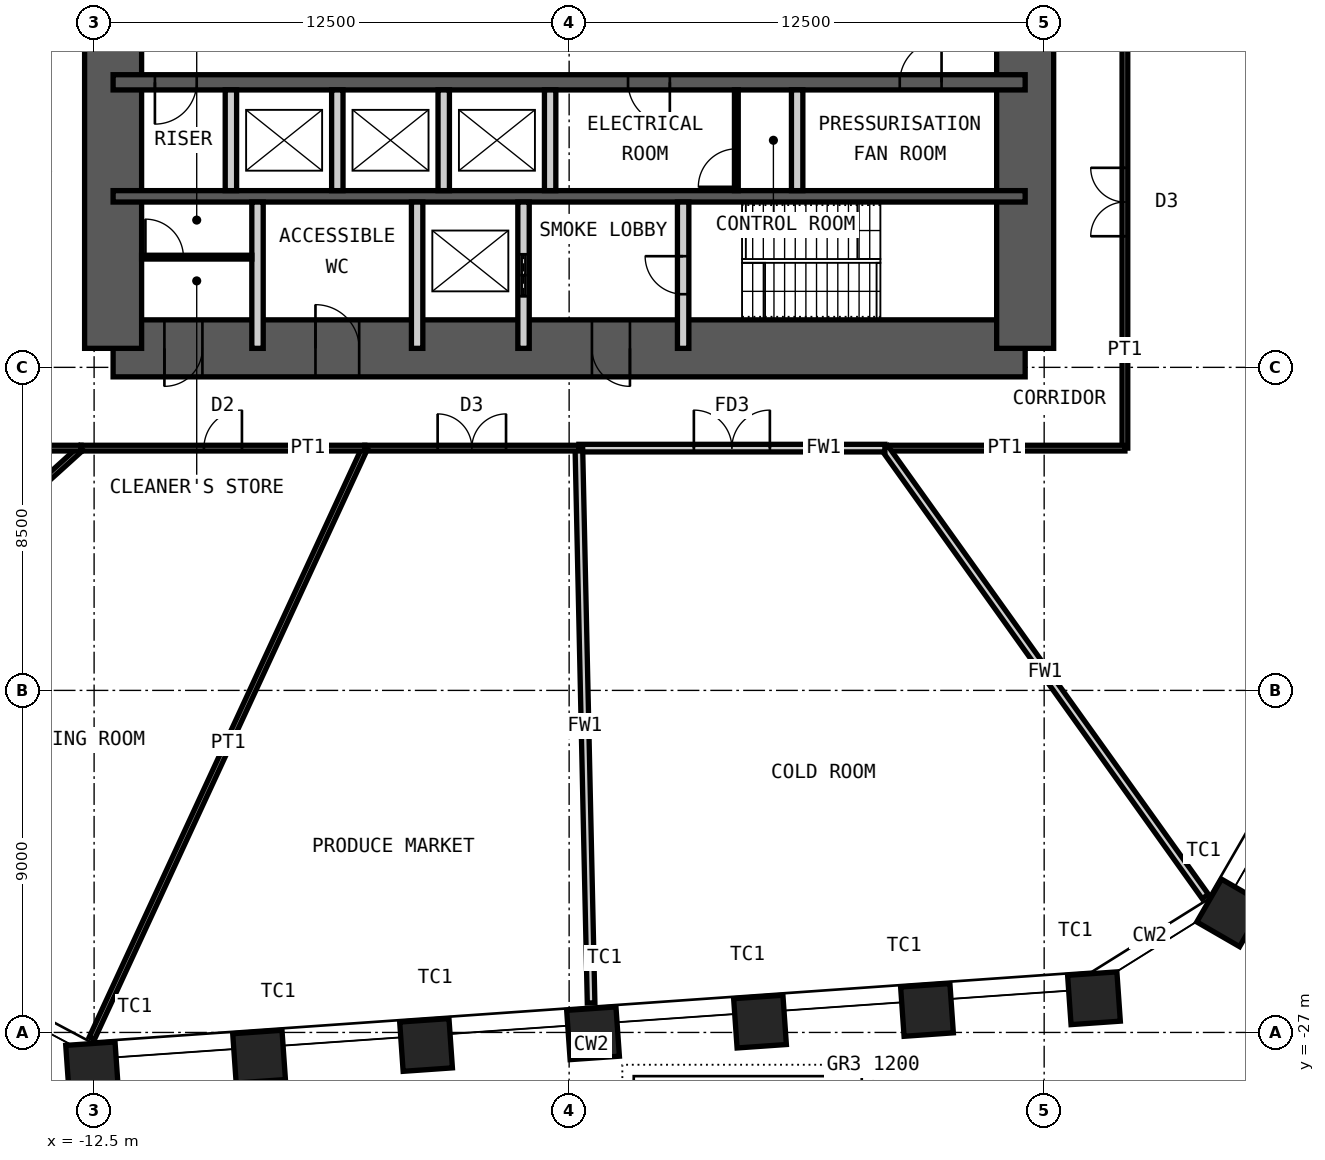
"""IFC4 building model, lengths in metres.
Left out: names, types, materials, properties, quantities, classifications, styles, units other than length and angle.
Written with IfcOpenShell. Run it as: python <this file> out.ifc"""

import sys

from ifc_helpers import new_model, si_unit, direction, frame, frame_2d, origin, origin_2d, place, context, subcontext, project, spatial, rectangle, hollow_rectangle, extrude, element, fill, save


model = new_model("IFC4")
c1 = context("Model", 3, precision=1e-05, world=origin(), true_north=direction((0.0, 1.0)))
c2 = subcontext(c1, "Body", "Model", "MODEL_VIEW")
j1 = project(units=[si_unit("LENGTHUNIT", "METRE"), si_unit("PLANEANGLEUNIT", "RADIAN")], contexts=[c1])
p1 = place(None, origin())
s1 = spatial("IfcSite", under=j1, at=p1, CompositionType="ELEMENT")
p2 = place(p1, origin())
s2 = spatial("IfcBuilding", under=s1, at=p2, CompositionType="ELEMENT")
p3 = place(p2, frame((0.0, 0.0, 17.0)))
s3 = spatial("IfcBuildingStorey", under=s2, at=p3, CompositionType="ELEMENT", Elevation=17.0)
for number, where, z_axis, x_axis in (
    (1, (17.405, -23.854, 0.0), (0.0, 0.0, 1.0), (0.5, 0.866, 0.0)),
    (2, (13.811, -26.1, 0.0), (0.0, 0.0, 1.0), (0.998, 0.07, 0.0)),
    (3, (9.417, -26.407, 0.0), (0.0, 0.0, 1.0), (0.998, 0.07, 0.0)),
    (4, (5.023, -26.715, 0.0), (0.0, 0.0, 1.0), (0.998, 0.07, 0.0)),
    (5, (0.629, -27.022, 0.0), (0.0, 0.0, 1.0), (0.998, 0.07, 0.0)),
    (6, (-3.765, -27.329, 0.0), (0.0, 0.0, 1.0), (0.998, 0.07, 0.0)),
    (7, (-8.159, -27.636, 0.0), (0.0, 0.0, 1.0), (0.998, 0.07, 0.0)),
    (8, (-12.553, -27.944, 0.0), (0.0, 0.0, 1.0), (0.998, 0.07, 0.0)),
):
    element("IfcColumn", number, at=place(p3, frame(where, z_axis=z_axis, x_axis=x_axis)), inside=s3, PredefinedType="COLUMN", context=c2, shape_type="SweptSolid", body=[
        extrude(hollow_rectangle(XDim=1.3, YDim=1.3, WallThickness=0.1, at=origin_2d()), origin(), (0.0, 0.0, 1.0), 5.0),
    ])
p4 = place(p3, frame((-12.0, -9.0, 0.0), z_axis=(0.0, 0.0, 1.0), x_axis=(1.0, 0.0, 0.0)))
e9 = element("IfcWall", 9, at=p4, inside=s3, PredefinedType="SHEAR", context=c2, shape_type="SweptSolid", body=[
    extrude(rectangle(XDim=24.0, YDim=1.5, at=frame_2d((12.0, 0.0))), origin(), (0.0, 0.0, 1.0), 5.0),
])
p5 = place(p4, frame((1.35, 0.0, 0.0)))
e10 = element("IfcOpeningElement", 10, at=p5, cuts=e9, PredefinedType="OPENING", context=c2, shape_type="SweptSolid", body=[
    extrude(rectangle(XDim=1.0, YDim=2.1, at=frame_2d((0.5, 1.05))), frame((0.0, 0.76, 0.0), z_axis=(0.0, -1.0, 0.0), x_axis=(1.0, 0.0, 0.0)), (0.0, 0.0, 1.0), 1.52),
])
p6 = place(p4, frame((5.325, 0.0, 0.0)))
e11 = element("IfcOpeningElement", 11, at=p6, cuts=e9, PredefinedType="OPENING", context=c2, shape_type="SweptSolid", body=[
    extrude(rectangle(XDim=1.15, YDim=2.1, at=frame_2d((0.575, 1.05))), frame((0.0, 0.76, 0.0), z_axis=(0.0, -1.0, 0.0), x_axis=(1.0, 0.0, 0.0)), (0.0, 0.0, 1.0), 1.52),
])
p7 = place(p4, frame((12.6, 0.0, 0.0)))
e12 = element("IfcOpeningElement", 12, at=p7, cuts=e9, PredefinedType="OPENING", context=c2, shape_type="SweptSolid", body=[
    extrude(rectangle(XDim=1.0, YDim=2.1, at=frame_2d((0.5, 1.05))), frame((0.0, 0.76, 0.0), z_axis=(0.0, -1.0, 0.0), x_axis=(1.0, 0.0, 0.0)), (0.0, 0.0, 1.0), 1.52),
])
p8 = place(p3, frame((12.0, -9.0, 0.0), z_axis=(0.0, 0.0, 1.0), x_axis=(0.0, 1.0, 0.0)))
e13 = element("IfcWall", 13, at=p8, inside=s3, PredefinedType="SHEAR", context=c2, shape_type="SweptSolid", body=[
    extrude(rectangle(XDim=18.0, YDim=1.5, at=frame_2d((9.0, 0.0))), origin(), (0.0, 0.0, 1.0), 5.0),
])
p9 = place(p8, frame((8.1, 0.0, 0.0)))
e14 = element("IfcOpeningElement", 14, at=p9, cuts=e13, PredefinedType="OPENING", context=c2, shape_type="SweptSolid", body=[
    extrude(rectangle(XDim=1.8, YDim=2.1, at=frame_2d((0.9, 1.05))), frame((0.0, 0.76, 0.0), z_axis=(0.0, -1.0, 0.0), x_axis=(1.0, 0.0, 0.0)), (0.0, 0.0, 1.0), 1.52),
])
p10 = place(p3, frame((-12.0, -9.0, 0.0), z_axis=(0.0, 0.0, 1.0), x_axis=(0.0, 1.0, 0.0)))
e15 = element("IfcWall", 15, at=p10, inside=s3, PredefinedType="SHEAR", context=c2, shape_type="SweptSolid", body=[
    extrude(rectangle(XDim=18.0, YDim=1.5, at=frame_2d((9.0, 0.0))), origin(), (0.0, 0.0, 1.0), 5.0),
])
p11 = place(p10, frame((8.1, 0.0, 0.0)))
e16 = element("IfcOpeningElement", 16, at=p11, cuts=e15, PredefinedType="OPENING", context=c2, shape_type="SweptSolid", body=[
    extrude(rectangle(XDim=1.8, YDim=2.1, at=frame_2d((0.9, 1.05))), frame((0.0, 0.76, 0.0), z_axis=(0.0, -1.0, 0.0), x_axis=(1.0, 0.0, 0.0)), (0.0, 0.0, 1.0), 1.52),
])
p12 = place(p3, frame((-12.0, -2.0, 0.0), z_axis=(0.0, 0.0, 1.0), x_axis=(1.0, 0.0, 0.0)))
e17 = element("IfcWall", 17, at=p12, inside=s3, PredefinedType="SHEAR", context=c2, shape_type="SweptSolid", body=[
    extrude(rectangle(XDim=24.0, YDim=0.4, at=frame_2d((12.0, 0.0))), origin(), (0.0, 0.0, 1.0), 5.0),
])
p13 = place(p12, frame((1.1, 0.0, 0.0)))
e18 = element("IfcOpeningElement", 18, at=p13, cuts=e17, PredefinedType="OPENING", context=c2, shape_type="SweptSolid", body=[
    extrude(rectangle(XDim=1.1, YDim=2.1, at=frame_2d((0.55, 1.05))), frame((0.0, 0.21, 0.0), z_axis=(0.0, -1.0, 0.0), x_axis=(1.0, 0.0, 0.0)), (0.0, 0.0, 1.0), 0.42),
])
p14 = place(p12, frame((13.55, 0.0, 0.0)))
e19 = element("IfcOpeningElement", 19, at=p14, cuts=e17, PredefinedType="OPENING", context=c2, shape_type="SweptSolid", body=[
    extrude(rectangle(XDim=1.1, YDim=2.1, at=frame_2d((0.55, 1.05))), frame((0.0, 0.21, 0.0), z_axis=(0.0, -1.0, 0.0), x_axis=(1.0, 0.0, 0.0)), (0.0, 0.0, 1.0), 0.42),
])
p15 = place(p12, frame((20.7, 0.0, 0.0)))
e20 = element("IfcOpeningElement", 20, at=p15, cuts=e17, PredefinedType="OPENING", context=c2, shape_type="SweptSolid", body=[
    extrude(rectangle(XDim=1.1, YDim=2.1, at=frame_2d((0.55, 1.05))), frame((0.0, 0.21, 0.0), z_axis=(0.0, -1.0, 0.0), x_axis=(1.0, 0.0, 0.0)), (0.0, 0.0, 1.0), 0.42),
])
p16 = place(p3, frame((-12.0, -5.0, 0.0), z_axis=(0.0, 0.0, 1.0), x_axis=(1.0, 0.0, 0.0)))
e21 = element("IfcWall", 21, at=p16, inside=s3, PredefinedType="SHEAR", context=c2, shape_type="SweptSolid", body=[
    extrude(rectangle(XDim=24.0, YDim=0.3, at=frame_2d((12.0, 0.0))), origin(), (0.0, 0.0, 1.0), 5.0),
])
for number, where, z_axis, x_axis in (
    (22, (-8.9, -4.85, 0.0), (0.0, 0.0, 1.0), (0.0, 1.0, 0.0)),
    (23, (-6.1, -4.85, 0.0), (0.0, 0.0, 1.0), (0.0, 1.0, 0.0)),
    (24, (-3.3, -4.85, 0.0), (0.0, 0.0, 1.0), (0.0, 1.0, 0.0)),
    (25, (-0.5, -4.85, 0.0), (0.0, 0.0, 1.0), (0.0, 1.0, 0.0)),
    (26, (6.0, -4.85, 0.0), (0.0, 0.0, 1.0), (0.0, 1.0, 0.0)),
):
    element("IfcWall", number, at=place(p3, frame(where, z_axis=z_axis, x_axis=x_axis)), inside=s3, PredefinedType="PARTITIONING", context=c2, shape_type="SweptSolid", body=[
        extrude(rectangle(XDim=2.65, YDim=0.3, at=frame_2d((1.325, 0.0))), origin(), (0.0, 0.0, 1.0), 4.78),
    ])
for number, where, z_axis, x_axis in (
    (27, (-8.2, -9.0, 0.0), (0.0, 0.0, 1.0), (0.0, 1.0, 0.0)),
    (28, (-4.0, -9.0, 0.0), (0.0, 0.0, 1.0), (0.0, 1.0, 0.0)),
):
    element("IfcWall", number, at=place(p3, frame(where, z_axis=z_axis, x_axis=x_axis)), inside=s3, PredefinedType="PARTITIONING", context=c2, shape_type="SweptSolid", body=[
        extrude(rectangle(XDim=3.85, YDim=0.3, at=frame_2d((1.925, 0.0))), origin(), (0.0, 0.0, 1.0), 4.78),
    ])
p17 = place(p3, frame((-1.2, -9.0, 0.0), z_axis=(0.0, 0.0, 1.0), x_axis=(0.0, 1.0, 0.0)))
e29 = element("IfcWall", 29, at=p17, inside=s3, PredefinedType="PARTITIONING", context=c2, shape_type="SweptSolid", body=[
    extrude(rectangle(XDim=3.85, YDim=0.3, at=frame_2d((1.925, 0.0))), origin(), (0.0, 0.0, 1.0), 4.78),
])
p18 = place(p17, frame((1.375, 0.0, 0.0)))
e30 = element("IfcOpeningElement", 30, at=p18, cuts=e29, PredefinedType="OPENING", context=c2, shape_type="SweptSolid", body=[
    extrude(rectangle(XDim=1.1, YDim=2.4, at=frame_2d((0.55, 1.2))), frame((0.0, 0.16, 0.0), z_axis=(0.0, -1.0, 0.0), x_axis=(1.0, 0.0, 0.0)), (0.0, 0.0, 1.0), 0.32),
])
p19 = place(p3, frame((3.0, -9.0, 0.0), z_axis=(0.0, 0.0, 1.0), x_axis=(0.0, 1.0, 0.0)))
e31 = element("IfcWall", 31, at=p19, inside=s3, PredefinedType="PARTITIONING", context=c2, shape_type="SweptSolid", body=[
    extrude(rectangle(XDim=3.85, YDim=0.3, at=frame_2d((1.925, 0.0))), origin(), (0.0, 0.0, 1.0), 4.78),
])
p20 = place(p19, frame((1.425, 0.0, 0.0)))
e32 = element("IfcOpeningElement", 32, at=p20, cuts=e31, PredefinedType="OPENING", context=c2, shape_type="SweptSolid", body=[
    extrude(rectangle(XDim=1.0, YDim=2.1, at=frame_2d((0.5, 1.05))), frame((0.0, 0.16, 0.0), z_axis=(0.0, -1.0, 0.0), x_axis=(1.0, 0.0, 0.0)), (0.0, 0.0, 1.0), 0.32),
])
p21 = place(p3, frame((4.4, -4.85, 0.0), z_axis=(0.0, 0.0, 1.0), x_axis=(0.0, 1.0, 0.0)))
e33 = element("IfcWall", 33, at=p21, inside=s3, PredefinedType="PARTITIONING", context=c2, shape_type="SweptSolid", body=[
    extrude(rectangle(XDim=2.65, YDim=0.1, at=frame_2d((1.325, 0.0))), origin(), (0.0, 0.0, 1.0), 4.78),
])
p22 = place(p21, frame((0.1, 0.0, 0.0)))
e34 = element("IfcOpeningElement", 34, at=p22, cuts=e33, PredefinedType="OPENING", context=c2, shape_type="SweptSolid", body=[
    extrude(rectangle(XDim=1.0, YDim=2.4, at=frame_2d((0.5, 1.2))), frame((0.0, 0.06, 0.0), z_axis=(0.0, -1.0, 0.0), x_axis=(1.0, 0.0, 0.0)), (0.0, 0.0, 1.0), 0.12),
])
p23 = place(p3, frame((-11.25, -6.6, 0.0), z_axis=(0.0, 0.0, 1.0), x_axis=(1.0, 0.0, 0.0)))
e35 = element("IfcWall", 35, at=p23, inside=s3, PredefinedType="PARTITIONING", context=c2, shape_type="SweptSolid", body=[
    extrude(rectangle(XDim=2.9, YDim=0.1, at=frame_2d((1.45, 0.0))), origin(), (0.0, 0.0, 1.0), 4.78),
])
p24 = place(p23, frame((0.1, 0.0, 0.0)))
e36 = element("IfcOpeningElement", 36, at=p24, cuts=e35, PredefinedType="OPENING", context=c2, shape_type="SweptSolid", body=[
    extrude(rectangle(XDim=1.0, YDim=2.4, at=frame_2d((0.5, 1.2))), frame((0.0, 0.06, 0.0), z_axis=(0.0, -1.0, 0.0), x_axis=(1.0, 0.0, 0.0)), (0.0, 0.0, 1.0), 0.12),
])
p25 = place(p3, frame((14.625, 1.325, 0.0), z_axis=(0.0, 0.0, 1.0), x_axis=(0.0, -1.0, 0.0)))
e37 = element("IfcWall", 37, at=p25, inside=s3, PredefinedType="PARTITIONING", context=c2, shape_type="SweptSolid", body=[
    extrude(rectangle(XDim=12.95, YDim=0.15, at=frame_2d((6.475, 0.0))), origin(), (0.0, 0.0, 1.0), 4.8),
])
p26 = place(p25, frame((5.575, 0.0, 0.0)))
e38 = element("IfcOpeningElement", 38, at=p26, cuts=e37, PredefinedType="OPENING", context=c2, shape_type="SweptSolid", body=[
    extrude(rectangle(XDim=1.8, YDim=2.4, at=frame_2d((0.9, 1.2))), frame((0.0, 0.085, 0.0), z_axis=(0.0, -1.0, 0.0), x_axis=(1.0, 0.0, 0.0)), (0.0, 0.0, 1.0), 0.17),
])
p27 = place(p3, frame((14.625, -11.625, 0.0), z_axis=(0.0, 0.0, 1.0), x_axis=(-1.0, 0.0, 0.0)))
e39 = element("IfcWall", 39, at=p27, inside=s3, PredefinedType="PARTITIONING", context=c2, shape_type="SweptSolid", body=[
    extrude(rectangle(XDim=6.317, YDim=0.15, at=frame_2d((3.158, 0.0))), origin(), (0.0, 0.0, 1.0), 4.8),
])
p28 = place(p3, frame((16.74, -23.423, 0.0), z_axis=(0.0, 0.0, 1.0), x_axis=(-0.581451576506, 0.813581012671, 0.0)))
e40 = element("IfcWall", 40, at=p28, inside=s3, PredefinedType="PARTITIONING", context=c2, shape_type="SweptSolid", body=[
    extrude(rectangle(XDim=14.501, YDim=0.2, at=frame_2d((7.251, 0.0))), origin(), (0.0, 0.0, 1.0), 3.7),
])
p29 = place(p3, frame((8.308, -11.625, 0.0), z_axis=(0.0, 0.0, 1.0), x_axis=(-1.0, 0.0, 0.0)))
e41 = element("IfcWall", 41, at=p29, inside=s3, PredefinedType="PARTITIONING", context=c2, shape_type="SweptSolid", body=[
    extrude(rectangle(XDim=8.052, YDim=0.2, at=frame_2d((4.026, 0.0))), origin(), (0.0, 0.0, 1.0), 4.8),
])
p30 = place(p29, frame((3.026, 0.0, 0.0)))
e42 = element("IfcOpeningElement", 42, at=p30, cuts=e41, PredefinedType="OPENING", context=c2, shape_type="SweptSolid", body=[
    extrude(rectangle(XDim=2.0, YDim=2.4, at=frame_2d((1.0, 1.2))), frame((0.0, 0.11, 0.0), z_axis=(0.0, -1.0, 0.0), x_axis=(1.0, 0.0, 0.0)), (0.0, 0.0, 1.0), 0.22),
])
p31 = place(p3, frame((0.578, -26.224, 0.0), z_axis=(0.0, 0.0, 1.0), x_axis=(-0.02203625582, 0.999757172232, 0.0)))
e43 = element("IfcWall", 43, at=p31, inside=s3, PredefinedType="PARTITIONING", context=c2, shape_type="SweptSolid", body=[
    extrude(rectangle(XDim=14.602, YDim=0.2, at=frame_2d((7.301, 0.0))), origin(), (0.0, 0.0, 1.0), 3.7),
])
p32 = place(p3, frame((0.256, -11.625, 0.0), z_axis=(0.0, 0.0, 1.0), x_axis=(-1.0, 0.0, 0.0)))
e44 = element("IfcWall", 44, at=p32, inside=s3, PredefinedType="PARTITIONING", context=c2, shape_type="SweptSolid", body=[
    extrude(rectangle(XDim=5.633, YDim=0.15, at=frame_2d((2.816, 0.0))), origin(), (0.0, 0.0, 1.0), 4.8),
])
p33 = place(p32, frame((1.917, 0.0, 0.0)))
e45 = element("IfcOpeningElement", 45, at=p33, cuts=e44, PredefinedType="OPENING", context=c2, shape_type="SweptSolid", body=[
    extrude(rectangle(XDim=1.8, YDim=2.4, at=frame_2d((0.9, 1.2))), frame((0.0, 0.085, 0.0), z_axis=(0.0, -1.0, 0.0), x_axis=(1.0, 0.0, 0.0)), (0.0, 0.0, 1.0), 0.17),
])
p34 = place(p3, frame((-12.56, -27.155, 0.0), z_axis=(0.0, 0.0, 1.0), x_axis=(0.419799104875, 0.907617051154, 0.0)))
e46 = element("IfcWall", 46, at=p34, inside=s3, PredefinedType="PARTITIONING", context=c2, shape_type="SweptSolid", body=[
    extrude(rectangle(XDim=17.11, YDim=0.15, at=frame_2d((8.555, 0.0))), origin(), (0.0, 0.0, 1.0), 3.7),
])
p35 = place(p3, frame((-5.377, -11.625, 0.0), z_axis=(0.0, 0.0, 1.0), x_axis=(-1.0, 0.0, 0.0)))
e47 = element("IfcWall", 47, at=p35, inside=s3, PredefinedType="PARTITIONING", context=c2, shape_type="SweptSolid", body=[
    extrude(rectangle(XDim=7.466, YDim=0.15, at=frame_2d((3.733, 0.0))), origin(), (0.0, 0.0, 1.0), 4.8),
])
p36 = place(p35, frame((3.233, 0.0, 0.0)))
e48 = element("IfcOpeningElement", 48, at=p36, cuts=e47, PredefinedType="OPENING", context=c2, shape_type="SweptSolid", body=[
    extrude(rectangle(XDim=1.0, YDim=2.4, at=frame_2d((0.5, 1.2))), frame((0.0, 0.085, 0.0), z_axis=(0.0, -1.0, 0.0), x_axis=(1.0, 0.0, 0.0)), (0.0, 0.0, 1.0), 0.17),
])
p37 = place(p3, frame((-19.871, -17.987, 0.0), z_axis=(0.0, 0.0, 1.0), x_axis=(0.741386887315, 0.671077851905, 0.0)))
e49 = element("IfcWall", 49, at=p37, inside=s3, PredefinedType="PARTITIONING", context=c2, shape_type="SweptSolid", body=[
    extrude(rectangle(XDim=9.48, YDim=0.15, at=frame_2d((4.74, 0.0))), origin(), (0.0, 0.0, 1.0), 3.7),
])
p38 = place(p3, frame((-12.843, -11.625, 0.0), z_axis=(0.0, 0.0, 1.0), x_axis=(-1.0, 0.0, 0.0)))
e50 = element("IfcWall", 50, at=p38, inside=s3, PredefinedType="PARTITIONING", context=c2, shape_type="SweptSolid", body=[
    extrude(rectangle(XDim=1.782, YDim=0.15, at=frame_2d((0.891, 0.0))), origin(), (0.0, 0.0, 1.0), 4.8),
])
p39 = place(p5, origin())
e51 = element("IfcDoor", 51, at=p39, inside=s3, OperationType="SINGLE_SWING_LEFT", PredefinedType="DOOR", context=c2, shape_type="SweptSolid", body=[
    extrude(rectangle(XDim=1.0, YDim=2.1, at=frame_2d((0.5, 1.05))), frame((0.0, 0.025, 0.0), z_axis=(0.0, -1.0, 0.0), x_axis=(1.0, 0.0, 0.0)), (0.0, 0.0, 1.0), 0.05),
])
fill(e10, e51)
p40 = place(p6, origin())
e52 = element("IfcDoor", 52, at=p40, inside=s3, OperationType="SINGLE_SWING_RIGHT", PredefinedType="DOOR", context=c2, shape_type="SweptSolid", body=[
    extrude(rectangle(XDim=1.15, YDim=2.1, at=frame_2d((0.575, 1.05))), frame((0.0, 0.025, 0.0), z_axis=(0.0, -1.0, 0.0), x_axis=(1.0, 0.0, 0.0)), (0.0, 0.0, 1.0), 0.05),
])
fill(e11, e52)
p41 = place(p7, origin())
e53 = element("IfcDoor", 53, at=p41, inside=s3, OperationType="SINGLE_SWING_RIGHT", PredefinedType="DOOR", context=c2, shape_type="SweptSolid", body=[
    extrude(rectangle(XDim=1.0, YDim=2.1, at=frame_2d((0.5, 1.05))), frame((0.0, 0.025, 0.0), z_axis=(0.0, -1.0, 0.0), x_axis=(1.0, 0.0, 0.0)), (0.0, 0.0, 1.0), 0.05),
])
fill(e12, e53)
p42 = place(p20, origin())
e54 = element("IfcDoor", 54, at=p42, inside=s3, OperationType="SINGLE_SWING_LEFT", PredefinedType="DOOR", context=c2, shape_type="SweptSolid", body=[
    extrude(rectangle(XDim=1.0, YDim=2.1, at=frame_2d((0.5, 1.05))), frame((0.0, 0.025, 0.0), z_axis=(0.0, -1.0, 0.0), x_axis=(1.0, 0.0, 0.0)), (0.0, 0.0, 1.0), 0.05),
])
fill(e32, e54)
p43 = place(p13, origin())
e55 = element("IfcDoor", 55, at=p43, inside=s3, OperationType="SINGLE_SWING_LEFT", PredefinedType="DOOR", context=c2, shape_type="SweptSolid", body=[
    extrude(rectangle(XDim=1.1, YDim=2.1, at=frame_2d((0.55, 1.05))), frame((0.0, 0.025, 0.0), z_axis=(0.0, -1.0, 0.0), x_axis=(1.0, 0.0, 0.0)), (0.0, 0.0, 1.0), 0.05),
])
fill(e18, e55)
p44 = place(p14, origin())
e56 = element("IfcDoor", 56, at=p44, inside=s3, OperationType="SINGLE_SWING_RIGHT", PredefinedType="DOOR", context=c2, shape_type="SweptSolid", body=[
    extrude(rectangle(XDim=1.1, YDim=2.1, at=frame_2d((0.55, 1.05))), frame((0.0, 0.025, 0.0), z_axis=(0.0, -1.0, 0.0), x_axis=(1.0, 0.0, 0.0)), (0.0, 0.0, 1.0), 0.05),
])
fill(e19, e56)
p45 = place(p15, origin())
e57 = element("IfcDoor", 57, at=p45, inside=s3, OperationType="SINGLE_SWING_LEFT", PredefinedType="DOOR", context=c2, shape_type="SweptSolid", body=[
    extrude(rectangle(XDim=1.1, YDim=2.1, at=frame_2d((0.55, 1.05))), frame((0.0, 0.025, 0.0), z_axis=(0.0, -1.0, 0.0), x_axis=(1.0, 0.0, 0.0)), (0.0, 0.0, 1.0), 0.05),
])
fill(e20, e57)
p46 = place(p18, origin())
e58 = element("IfcDoor", 58, at=p46, inside=s3, OperationType="DOUBLE_DOOR_SLIDING", PredefinedType="DOOR", context=c2, shape_type="SweptSolid", body=[
    extrude(rectangle(XDim=1.1, YDim=2.4, at=frame_2d((0.55, 1.2))), frame((0.0, 0.025, 0.0), z_axis=(0.0, -1.0, 0.0), x_axis=(1.0, 0.0, 0.0)), (0.0, 0.0, 1.0), 0.05),
])
fill(e30, e58)
p47 = place(p22, origin())
e59 = element("IfcDoor", 59, at=p47, inside=s3, OperationType="SINGLE_SWING_RIGHT", PredefinedType="DOOR", context=c2, shape_type="SweptSolid", body=[
    extrude(rectangle(XDim=1.0, YDim=2.4, at=frame_2d((0.5, 1.2))), frame((0.0, 0.025, 0.0), z_axis=(0.0, -1.0, 0.0), x_axis=(1.0, 0.0, 0.0)), (0.0, 0.0, 1.0), 0.05),
])
fill(e34, e59)
p48 = place(p24, origin())
e60 = element("IfcDoor", 60, at=p48, inside=s3, OperationType="SINGLE_SWING_RIGHT", PredefinedType="DOOR", context=c2, shape_type="SweptSolid", body=[
    extrude(rectangle(XDim=1.0, YDim=2.4, at=frame_2d((0.5, 1.2))), frame((0.0, 0.025, 0.0), z_axis=(0.0, -1.0, 0.0), x_axis=(1.0, 0.0, 0.0)), (0.0, 0.0, 1.0), 0.05),
])
fill(e36, e60)
p49 = place(p26, origin())
e61 = element("IfcDoor", 61, at=p49, inside=s3, OperationType="DOUBLE_DOOR_DOUBLE_SWING", PredefinedType="DOOR", context=c2, shape_type="SweptSolid", body=[
    extrude(rectangle(XDim=1.8, YDim=2.4, at=frame_2d((0.9, 1.2))), frame((0.0, 0.025, 0.0), z_axis=(0.0, -1.0, 0.0), x_axis=(1.0, 0.0, 0.0)), (0.0, 0.0, 1.0), 0.05),
])
fill(e38, e61)
p50 = place(p30, origin())
e62 = element("IfcDoor", 62, at=p50, inside=s3, OperationType="DOUBLE_DOOR_DOUBLE_SWING", PredefinedType="DOOR", context=c2, shape_type="SweptSolid", body=[
    extrude(rectangle(XDim=2.0, YDim=2.4, at=frame_2d((1.0, 1.2))), frame((0.0, 0.025, 0.0), z_axis=(0.0, -1.0, 0.0), x_axis=(1.0, 0.0, 0.0)), (0.0, 0.0, 1.0), 0.05),
])
fill(e42, e62)
p51 = place(p33, origin())
e63 = element("IfcDoor", 63, at=p51, inside=s3, OperationType="DOUBLE_DOOR_DOUBLE_SWING", PredefinedType="DOOR", context=c2, shape_type="SweptSolid", body=[
    extrude(rectangle(XDim=1.8, YDim=2.4, at=frame_2d((0.9, 1.2))), frame((0.0, 0.025, 0.0), z_axis=(0.0, -1.0, 0.0), x_axis=(1.0, 0.0, 0.0)), (0.0, 0.0, 1.0), 0.05),
])
fill(e45, e63)
p52 = place(p36, origin())
e64 = element("IfcDoor", 64, at=p52, inside=s3, OperationType="SINGLE_SWING_LEFT", PredefinedType="DOOR", context=c2, shape_type="SweptSolid", body=[
    extrude(rectangle(XDim=1.0, YDim=2.4, at=frame_2d((0.5, 1.2))), frame((0.0, 0.025, 0.0), z_axis=(0.0, -1.0, 0.0), x_axis=(1.0, 0.0, 0.0)), (0.0, 0.0, 1.0), 0.05),
])
fill(e48, e64)
p53 = place(p3, frame((0.0, 0.0, -0.3)))
p54 = place(p53, frame((4.7, -29.35, 0.0)))
p55 = place(p54, frame((0.0, 0.0, 0.25)))
e65 = element("IfcWindow", 65, at=p55, inside=s3, PartitioningType="SINGLE_PANEL", PredefinedType="SKYLIGHT", context=c2, shape_type="SweptSolid", body=[
    extrude(rectangle(XDim=6.0, YDim=2.4, at=origin_2d()), origin(), (0.0, 0.0, 1.0), 0.05),
])
save(model, sys.argv[1])
